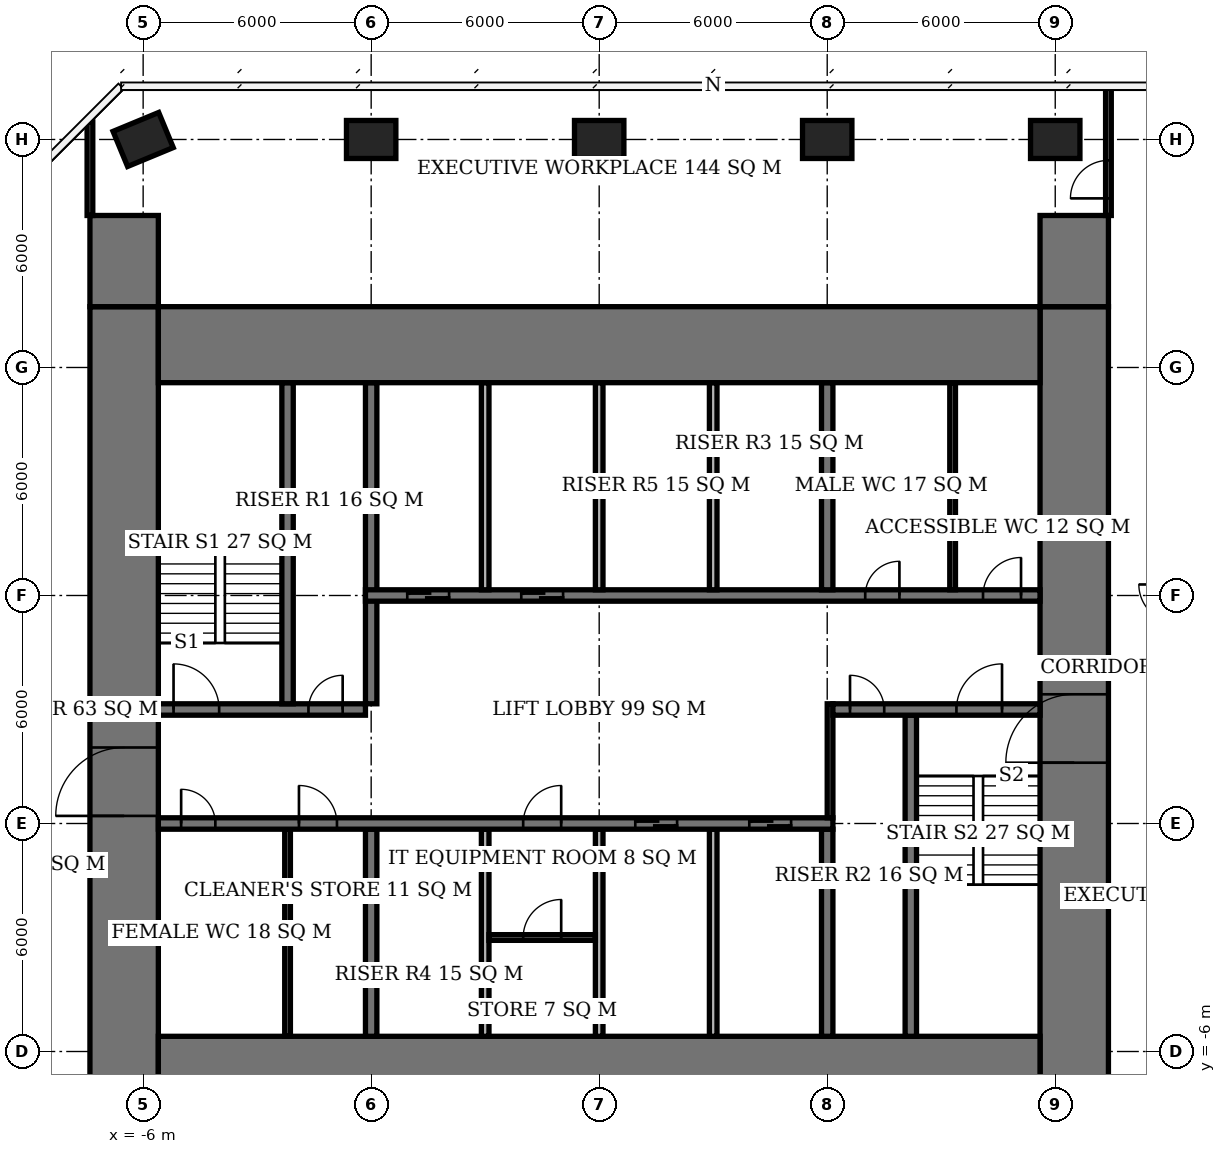
"""IFC4 building model, lengths in metres.
Left out: names, types, materials, properties, quantities, classifications, styles, units other than length and angle.
Written with IfcOpenShell. Run it as: python <this file> out.ifc"""

import sys

from ifc_helpers import new_model, si_unit, direction, frame, frame_2d, origin, origin_2d, place, context, subcontext, project, spatial, rectangle, extrude, element, fill, save


model = new_model("IFC4")
c1 = context("Model", 3, precision=1e-05, world=origin(), true_north=direction((0.0, 1.0)))
c2 = subcontext(c1, "Body", "Model", "MODEL_VIEW")
j1 = project(units=[si_unit("LENGTHUNIT", "METRE"), si_unit("PLANEANGLEUNIT", "RADIAN")], contexts=[c1])
p1 = place(None, origin())
s1 = spatial("IfcSite", under=j1, at=p1, CompositionType="ELEMENT")
p2 = place(p1, origin())
s2 = spatial("IfcBuilding", under=s1, at=p2, CompositionType="ELEMENT")
p3 = place(p2, frame((0.0, 0.0, 291.8)))
s3 = spatial("IfcBuildingStorey", under=s2, at=p3, CompositionType="ELEMENT", Elevation=291.8)
for number, where, z_axis, x_axis in (
    (1, (-6.0, 18.0, 0.0), (0.0, 0.0, 1.0), (0.924, 0.383, 0.0)),
    (2, (0.0, 18.0, 0.0), (0.0, 0.0, 1.0), (1.0, 0.0, 0.0)),
    (3, (6.0, 18.0, 0.0), (0.0, 0.0, 1.0), (1.0, 0.0, 0.0)),
    (4, (12.0, 18.0, 0.0), (0.0, 0.0, 1.0), (1.0, 0.0, 0.0)),
    (5, (18.0, 18.0, 0.0), (0.0, 0.0, 1.0), (1.0, 0.0, 0.0)),
):
    element("IfcColumn", number, at=place(p3, frame(where, z_axis=z_axis, x_axis=x_axis)), inside=s3, PredefinedType="COLUMN", context=c2, shape_type="SweptSolid", body=[
        extrude(rectangle(XDim=1.3, YDim=1.0, at=origin_2d()), origin(), (0.0, 0.0, 1.0), 3.9),
    ])
for number, where, z_axis, x_axis in (
    (6, (-5.6, -6.6, 0.0), (0.0, 0.0, 1.0), (1.0, 0.0, 0.0)),
    (7, (-5.6, 12.6, 0.0), (0.0, 0.0, 1.0), (1.0, 0.0, 0.0)),
):
    element("IfcWall", number, at=place(p3, frame(where, z_axis=z_axis, x_axis=x_axis)), inside=s3, PredefinedType="SHEAR", context=c2, shape_type="SweptSolid", body=[
        extrude(rectangle(XDim=23.2, YDim=2.0, at=frame_2d((11.6, 0.0))), origin(), (0.0, 0.0, 1.0), 3.9),
    ])
p4 = place(p3, frame((-6.5, -7.6, 0.0), z_axis=(0.0, 0.0, 1.0), x_axis=(0.0, 1.0, 0.0)))
e8 = element("IfcWall", 8, at=p4, inside=s3, PredefinedType="SHEAR", context=c2, shape_type="SweptSolid", body=[
    extrude(rectangle(XDim=21.2, YDim=1.8, at=frame_2d((10.6, 0.0))), origin(), (0.0, 0.0, 1.0), 3.9),
])
p5 = place(p4, frame((7.8, 0.0, 0.0)))
e9 = element("IfcOpeningElement", 9, at=p5, cuts=e8, PredefinedType="OPENING", context=c2, shape_type="SweptSolid", body=[
    extrude(rectangle(XDim=1.8, YDim=2.4, at=frame_2d((0.9, 1.2))), frame((0.0, 0.91, 0.0), z_axis=(0.0, -1.0, 0.0), x_axis=(1.0, 0.0, 0.0)), (0.0, 0.0, 1.0), 1.82),
])
p6 = place(p3, frame((18.5, -7.6, 0.0), z_axis=(0.0, 0.0, 1.0), x_axis=(0.0, 1.0, 0.0)))
e10 = element("IfcWall", 10, at=p6, inside=s3, PredefinedType="SHEAR", context=c2, shape_type="SweptSolid", body=[
    extrude(rectangle(XDim=21.2, YDim=1.8, at=frame_2d((10.6, 0.0))), origin(), (0.0, 0.0, 1.0), 3.9),
])
p7 = place(p6, frame((9.2, 0.0, 0.0)))
e11 = element("IfcOpeningElement", 11, at=p7, cuts=e10, PredefinedType="OPENING", context=c2, shape_type="SweptSolid", body=[
    extrude(rectangle(XDim=1.8, YDim=2.4, at=frame_2d((0.9, 1.2))), frame((0.0, 0.91, 0.0), z_axis=(0.0, -1.0, 0.0), x_axis=(1.0, 0.0, 0.0)), (0.0, 0.0, 1.0), 1.82),
])
for number, where, z_axis, x_axis in (
    (12, (-6.5, 13.6, 0.0), (0.0, 0.0, 1.0), (0.0, 1.0, 0.0)),
    (13, (18.5, 13.6, 0.0), (0.0, 0.0, 1.0), (0.0, 1.0, 0.0)),
):
    element("IfcWall", number, at=place(p3, frame(where, z_axis=z_axis, x_axis=x_axis)), inside=s3, PredefinedType="SHEAR", context=c2, shape_type="SweptSolid", body=[
        extrude(rectangle(XDim=2.4, YDim=1.8, at=frame_2d((1.2, 0.0))), origin(), (0.0, 0.0, 1.0), 3.9),
    ])
p8 = place(p3, frame((-5.6, 0.0, 0.0), z_axis=(0.0, 0.0, 1.0), x_axis=(1.0, 0.0, 0.0)))
e14 = element("IfcWall", 14, at=p8, inside=s3, PredefinedType="SHEAR", context=c2, shape_type="SweptSolid", body=[
    extrude(rectangle(XDim=17.75, YDim=0.3, at=frame_2d((8.875, 0.0))), origin(), (0.0, 0.0, 1.0), 3.9),
])
p9 = place(p8, frame((0.6, 0.0, 0.0)))
e15 = element("IfcOpeningElement", 15, at=p9, cuts=e14, PredefinedType="OPENING", context=c2, shape_type="SweptSolid", body=[
    extrude(rectangle(XDim=0.9, YDim=2.1, at=frame_2d((0.45, 1.05))), frame((0.0, 0.16, 0.0), z_axis=(0.0, -1.0, 0.0), x_axis=(1.0, 0.0, 0.0)), (0.0, 0.0, 1.0), 0.32),
])
p10 = place(p8, frame((3.7, 0.0, 0.0)))
e16 = element("IfcOpeningElement", 16, at=p10, cuts=e14, PredefinedType="OPENING", context=c2, shape_type="SweptSolid", body=[
    extrude(rectangle(XDim=1.0, YDim=2.1, at=frame_2d((0.5, 1.05))), frame((0.0, 0.16, 0.0), z_axis=(0.0, -1.0, 0.0), x_axis=(1.0, 0.0, 0.0)), (0.0, 0.0, 1.0), 0.32),
])
p11 = place(p8, frame((9.6, 0.0, 0.0)))
e17 = element("IfcOpeningElement", 17, at=p11, cuts=e14, PredefinedType="OPENING", context=c2, shape_type="SweptSolid", body=[
    extrude(rectangle(XDim=1.0, YDim=2.1, at=frame_2d((0.5, 1.05))), frame((0.0, 0.16, 0.0), z_axis=(0.0, -1.0, 0.0), x_axis=(1.0, 0.0, 0.0)), (0.0, 0.0, 1.0), 0.32),
])
p12 = place(p8, frame((12.55, 0.0, 0.0)))
e18 = element("IfcOpeningElement", 18, at=p12, cuts=e14, PredefinedType="OPENING", context=c2, shape_type="SweptSolid", body=[
    extrude(rectangle(XDim=1.1, YDim=2.1, at=frame_2d((0.55, 1.05))), frame((0.0, 0.16, 0.0), z_axis=(0.0, -1.0, 0.0), x_axis=(1.0, 0.0, 0.0)), (0.0, 0.0, 1.0), 0.32),
])
p13 = place(p8, frame((15.55, 0.0, 0.0)))
e19 = element("IfcOpeningElement", 19, at=p13, cuts=e14, PredefinedType="OPENING", context=c2, shape_type="SweptSolid", body=[
    extrude(rectangle(XDim=1.1, YDim=2.1, at=frame_2d((0.55, 1.05))), frame((0.0, 0.16, 0.0), z_axis=(0.0, -1.0, 0.0), x_axis=(1.0, 0.0, 0.0)), (0.0, 0.0, 1.0), 0.32),
])
p14 = place(p3, frame((-5.6, 3.0, 0.0), z_axis=(0.0, 0.0, 1.0), x_axis=(1.0, 0.0, 0.0)))
e20 = element("IfcWall", 20, at=p14, inside=s3, PredefinedType="SHEAR", context=c2, shape_type="SweptSolid", body=[
    extrude(rectangle(XDim=5.45, YDim=0.3, at=frame_2d((2.725, 0.0))), origin(), (0.0, 0.0, 1.0), 3.9),
])
p15 = place(p14, frame((0.4, 0.0, 0.0)))
e21 = element("IfcOpeningElement", 21, at=p15, cuts=e20, PredefinedType="OPENING", context=c2, shape_type="SweptSolid", body=[
    extrude(rectangle(XDim=1.2, YDim=2.1, at=frame_2d((0.6, 1.05))), frame((0.0, 0.16, 0.0), z_axis=(0.0, -1.0, 0.0), x_axis=(1.0, 0.0, 0.0)), (0.0, 0.0, 1.0), 0.32),
])
p16 = place(p14, frame((3.95, 0.0, 0.0)))
e22 = element("IfcOpeningElement", 22, at=p16, cuts=e20, PredefinedType="OPENING", context=c2, shape_type="SweptSolid", body=[
    extrude(rectangle(XDim=0.9, YDim=2.1, at=frame_2d((0.45, 1.05))), frame((0.0, 0.16, 0.0), z_axis=(0.0, -1.0, 0.0), x_axis=(1.0, 0.0, 0.0)), (0.0, 0.0, 1.0), 0.32),
])
p17 = place(p3, frame((12.15, 3.0, 0.0), z_axis=(0.0, 0.0, 1.0), x_axis=(1.0, 0.0, 0.0)))
e23 = element("IfcWall", 23, at=p17, inside=s3, PredefinedType="SHEAR", context=c2, shape_type="SweptSolid", body=[
    extrude(rectangle(XDim=5.45, YDim=0.3, at=frame_2d((2.725, 0.0))), origin(), (0.0, 0.0, 1.0), 3.9),
])
p18 = place(p17, frame((3.25, 0.0, 0.0)))
e24 = element("IfcOpeningElement", 24, at=p18, cuts=e23, PredefinedType="OPENING", context=c2, shape_type="SweptSolid", body=[
    extrude(rectangle(XDim=1.2, YDim=2.1, at=frame_2d((0.6, 1.05))), frame((0.0, 0.16, 0.0), z_axis=(0.0, -1.0, 0.0), x_axis=(1.0, 0.0, 0.0)), (0.0, 0.0, 1.0), 0.32),
])
p19 = place(p17, frame((0.45, 0.0, 0.0)))
e25 = element("IfcOpeningElement", 25, at=p19, cuts=e23, PredefinedType="OPENING", context=c2, shape_type="SweptSolid", body=[
    extrude(rectangle(XDim=0.9, YDim=2.1, at=frame_2d((0.45, 1.05))), frame((0.0, 0.16, 0.0), z_axis=(0.0, -1.0, 0.0), x_axis=(1.0, 0.0, 0.0)), (0.0, 0.0, 1.0), 0.32),
])
p20 = place(p3, frame((-0.15, 6.0, 0.0), z_axis=(0.0, 0.0, 1.0), x_axis=(1.0, 0.0, 0.0)))
e26 = element("IfcWall", 26, at=p20, inside=s3, PredefinedType="SHEAR", context=c2, shape_type="SweptSolid", body=[
    extrude(rectangle(XDim=17.75, YDim=0.3, at=frame_2d((8.875, 0.0))), origin(), (0.0, 0.0, 1.0), 3.9),
])
p21 = place(p20, frame((13.15, 0.0, 0.0)))
e27 = element("IfcOpeningElement", 27, at=p21, cuts=e26, PredefinedType="OPENING", context=c2, shape_type="SweptSolid", body=[
    extrude(rectangle(XDim=0.9, YDim=2.1, at=frame_2d((0.45, 1.05))), frame((0.0, 0.16, 0.0), z_axis=(0.0, -1.0, 0.0), x_axis=(1.0, 0.0, 0.0)), (0.0, 0.0, 1.0), 0.32),
])
p22 = place(p20, frame((16.25, 0.0, 0.0)))
e28 = element("IfcOpeningElement", 28, at=p22, cuts=e26, PredefinedType="OPENING", context=c2, shape_type="SweptSolid", body=[
    extrude(rectangle(XDim=1.0, YDim=2.1, at=frame_2d((0.5, 1.05))), frame((0.0, 0.16, 0.0), z_axis=(0.0, -1.0, 0.0), x_axis=(1.0, 0.0, 0.0)), (0.0, 0.0, 1.0), 0.32),
])
p23 = place(p20, frame((1.1, 0.0, 0.0)))
e29 = element("IfcOpeningElement", 29, at=p23, cuts=e26, PredefinedType="OPENING", context=c2, shape_type="SweptSolid", body=[
    extrude(rectangle(XDim=1.1, YDim=2.1, at=frame_2d((0.55, 1.05))), frame((0.0, 0.16, 0.0), z_axis=(0.0, -1.0, 0.0), x_axis=(1.0, 0.0, 0.0)), (0.0, 0.0, 1.0), 0.32),
])
p24 = place(p20, frame((4.1, 0.0, 0.0)))
e30 = element("IfcOpeningElement", 30, at=p24, cuts=e26, PredefinedType="OPENING", context=c2, shape_type="SweptSolid", body=[
    extrude(rectangle(XDim=1.1, YDim=2.1, at=frame_2d((0.55, 1.05))), frame((0.0, 0.16, 0.0), z_axis=(0.0, -1.0, 0.0), x_axis=(1.0, 0.0, 0.0)), (0.0, 0.0, 1.0), 0.32),
])
p25 = place(p3, frame((0.0, -5.6, 0.0), z_axis=(0.0, 0.0, 1.0), x_axis=(0.0, 1.0, 0.0)))
e31 = element("IfcWall", 31, at=p25, inside=s3, PredefinedType="SHEAR", context=c2, shape_type="SweptSolid", body=[
    extrude(rectangle(XDim=5.45, YDim=0.3, at=frame_2d((2.725, 0.0))), origin(), (0.0, 0.0, 1.0), 3.9),
])
p26 = place(p3, frame((0.0, 3.15, 0.0), z_axis=(0.0, 0.0, 1.0), x_axis=(0.0, 1.0, 0.0)))
e32 = element("IfcWall", 32, at=p26, inside=s3, PredefinedType="SHEAR", context=c2, shape_type="SweptSolid", body=[
    extrude(rectangle(XDim=8.45, YDim=0.3, at=frame_2d((4.225, 0.0))), origin(), (0.0, 0.0, 1.0), 3.9),
])
for number, where, z_axis, x_axis in (
    (33, (12.0, -5.6, 0.0), (0.0, 0.0, 1.0), (0.0, 1.0, 0.0)),
    (34, (12.0, 6.15, 0.0), (0.0, 0.0, 1.0), (0.0, 1.0, 0.0)),
):
    element("IfcWall", number, at=place(p3, frame(where, z_axis=z_axis, x_axis=x_axis)), inside=s3, PredefinedType="SHEAR", context=c2, shape_type="SweptSolid", body=[
        extrude(rectangle(XDim=5.45, YDim=0.3, at=frame_2d((2.725, 0.0))), origin(), (0.0, 0.0, 1.0), 3.9),
    ])
for number, where, z_axis, x_axis in (
    (35, (-2.2, 3.15, 0.0), (0.0, 0.0, 1.0), (0.0, 1.0, 0.0)),
    (36, (14.2, -5.6, 0.0), (0.0, 0.0, 1.0), (0.0, 1.0, 0.0)),
):
    element("IfcWall", number, at=place(p3, frame(where, z_axis=z_axis, x_axis=x_axis)), inside=s3, PredefinedType="SHEAR", context=c2, shape_type="SweptSolid", body=[
        extrude(rectangle(XDim=8.45, YDim=0.3, at=frame_2d((4.225, 0.0))), origin(), (0.0, 0.0, 1.0), 3.9),
    ])
for number, where, z_axis, x_axis in (
    (37, (3.0, 6.15, 0.0), (0.0, 0.0, 1.0), (0.0, 1.0, 0.0)),
    (38, (6.0, 6.15, 0.0), (0.0, 0.0, 1.0), (0.0, 1.0, 0.0)),
    (39, (9.0, 6.15, 0.0), (0.0, 0.0, 1.0), (0.0, 1.0, 0.0)),
    (40, (3.0, -5.6, 0.0), (0.0, 0.0, 1.0), (0.0, 1.0, 0.0)),
    (41, (6.0, -5.6, 0.0), (0.0, 0.0, 1.0), (0.0, 1.0, 0.0)),
    (42, (9.0, -5.6, 0.0), (0.0, 0.0, 1.0), (0.0, 1.0, 0.0)),
):
    element("IfcWall", number, at=place(p3, frame(where, z_axis=z_axis, x_axis=x_axis)), inside=s3, PredefinedType="SOLIDWALL", context=c2, shape_type="SweptSolid", body=[
        extrude(rectangle(XDim=5.45, YDim=0.2, at=frame_2d((2.725, 0.0))), origin(), (0.0, 0.0, 1.0), 3.9),
    ])
for number, where, z_axis, x_axis in (
    (43, (-2.2, -5.6, 0.0), (0.0, 0.0, 1.0), (0.0, 1.0, 0.0)),
    (44, (15.3, 6.15, 0.0), (0.0, 0.0, 1.0), (0.0, 1.0, 0.0)),
):
    element("IfcWall", number, at=place(p3, frame(where, z_axis=z_axis, x_axis=x_axis)), inside=s3, PredefinedType="PLUMBINGWALL", context=c2, shape_type="SweptSolid", body=[
        extrude(rectangle(XDim=5.45, YDim=0.15, at=frame_2d((2.725, 0.0))), origin(), (0.0, 0.0, 1.0), 3.65),
    ])
p27 = place(p3, frame((3.1, -3.0, 0.0), z_axis=(0.0, 0.0, 1.0), x_axis=(1.0, 0.0, 0.0)))
e45 = element("IfcWall", 45, at=p27, inside=s3, PredefinedType="PARTITIONING", context=c2, shape_type="SweptSolid", body=[
    extrude(rectangle(XDim=2.8, YDim=0.15, at=frame_2d((1.4, 0.0))), origin(), (0.0, 0.0, 1.0), 3.65),
])
p28 = place(p27, frame((0.9, 0.0, 0.0)))
e46 = element("IfcOpeningElement", 46, at=p28, cuts=e45, PredefinedType="OPENING", context=c2, shape_type="SweptSolid", body=[
    extrude(rectangle(XDim=1.0, YDim=2.1, at=frame_2d((0.5, 1.05))), frame((0.0, 0.085, 0.0), z_axis=(0.0, -1.0, 0.0), x_axis=(1.0, 0.0, 0.0)), (0.0, 0.0, 1.0), 0.17),
])
p29 = place(p3, frame((-7.4, 16.0, 0.0), z_axis=(0.0, 0.0, 1.0), x_axis=(0.0, 1.0, 0.0)))
e47 = element("IfcWall", 47, at=p29, inside=s3, PredefinedType="PARTITIONING", context=c2, shape_type="SweptSolid", body=[
    extrude(rectangle(XDim=2.464, YDim=0.15, at=frame_2d((1.232, 0.0))), origin(), (0.0, 0.0, 1.0), 3.65),
])
p30 = place(p3, frame((19.4, 16.0, 0.0), z_axis=(0.0, 0.0, 1.0), x_axis=(0.0, 1.0, 0.0)))
e48 = element("IfcWall", 48, at=p30, inside=s3, PredefinedType="PARTITIONING", context=c2, shape_type="SweptSolid", body=[
    extrude(rectangle(XDim=3.375, YDim=0.15, at=frame_2d((1.688, 0.0))), origin(), (0.0, 0.0, 1.0), 3.65),
])
p31 = place(p30, frame((0.45, 0.0, 0.0)))
e49 = element("IfcOpeningElement", 49, at=p31, cuts=e48, PredefinedType="OPENING", context=c2, shape_type="SweptSolid", body=[
    extrude(rectangle(XDim=1.0, YDim=2.1, at=frame_2d((0.5, 1.05))), frame((0.0, 0.085, 0.0), z_axis=(0.0, -1.0, 0.0), x_axis=(1.0, 0.0, 0.0)), (0.0, 0.0, 1.0), 0.17),
])
p32 = place(p3, frame((12.075, 0.15, 0.0), z_axis=(0.0, 0.0, 1.0), x_axis=(0.0, 1.0, 0.0)))
e50 = element("IfcWall", 50, at=p32, inside=s3, PredefinedType="PARTITIONING", context=c2, shape_type="SweptSolid", body=[
    extrude(rectangle(XDim=3.0, YDim=0.15, at=frame_2d((1.5, 0.0))), origin(), (0.0, 0.0, 1.0), 3.65),
])
p33 = place(p5, origin())
e51 = element("IfcDoor", 51, at=p33, inside=s3, OperationType="DOUBLE_DOOR_SINGLE_SWING", PredefinedType="DOOR", context=c2, shape_type="SweptSolid", body=[
    extrude(rectangle(XDim=1.8, YDim=2.4, at=frame_2d((0.9, 1.2))), frame((0.0, 0.025, 0.0), z_axis=(0.0, -1.0, 0.0), x_axis=(1.0, 0.0, 0.0)), (0.0, 0.0, 1.0), 0.05),
])
fill(e9, e51)
p34 = place(p7, origin())
e52 = element("IfcDoor", 52, at=p34, inside=s3, OperationType="DOUBLE_DOOR_SINGLE_SWING", PredefinedType="DOOR", context=c2, shape_type="SweptSolid", body=[
    extrude(rectangle(XDim=1.8, YDim=2.4, at=frame_2d((0.9, 1.2))), frame((0.0, 0.025, 0.0), z_axis=(0.0, -1.0, 0.0), x_axis=(1.0, 0.0, 0.0)), (0.0, 0.0, 1.0), 0.05),
])
fill(e11, e52)
p35 = place(p15, origin())
e53 = element("IfcDoor", 53, at=p35, inside=s3, OperationType="SINGLE_SWING_LEFT", PredefinedType="DOOR", context=c2, shape_type="SweptSolid", body=[
    extrude(rectangle(XDim=1.2, YDim=2.1, at=frame_2d((0.6, 1.05))), frame((0.0, 0.025, 0.0), z_axis=(0.0, -1.0, 0.0), x_axis=(1.0, 0.0, 0.0)), (0.0, 0.0, 1.0), 0.05),
])
fill(e21, e53)
p36 = place(p16, origin())
e54 = element("IfcDoor", 54, at=p36, inside=s3, OperationType="SINGLE_SWING_RIGHT", PredefinedType="DOOR", context=c2, shape_type="SweptSolid", body=[
    extrude(rectangle(XDim=0.9, YDim=2.1, at=frame_2d((0.45, 1.05))), frame((0.0, 0.025, 0.0), z_axis=(0.0, -1.0, 0.0), x_axis=(1.0, 0.0, 0.0)), (0.0, 0.0, 1.0), 0.05),
])
fill(e22, e54)
p37 = place(p18, origin())
e55 = element("IfcDoor", 55, at=p37, inside=s3, OperationType="SINGLE_SWING_RIGHT", PredefinedType="DOOR", context=c2, shape_type="SweptSolid", body=[
    extrude(rectangle(XDim=1.2, YDim=2.1, at=frame_2d((0.6, 1.05))), frame((0.0, 0.025, 0.0), z_axis=(0.0, -1.0, 0.0), x_axis=(1.0, 0.0, 0.0)), (0.0, 0.0, 1.0), 0.05),
])
fill(e24, e55)
p38 = place(p19, origin())
e56 = element("IfcDoor", 56, at=p38, inside=s3, OperationType="SINGLE_SWING_LEFT", PredefinedType="DOOR", context=c2, shape_type="SweptSolid", body=[
    extrude(rectangle(XDim=0.9, YDim=2.1, at=frame_2d((0.45, 1.05))), frame((0.0, 0.025, 0.0), z_axis=(0.0, -1.0, 0.0), x_axis=(1.0, 0.0, 0.0)), (0.0, 0.0, 1.0), 0.05),
])
fill(e25, e56)
p39 = place(p9, origin())
e57 = element("IfcDoor", 57, at=p39, inside=s3, OperationType="SINGLE_SWING_LEFT", PredefinedType="DOOR", context=c2, shape_type="SweptSolid", body=[
    extrude(rectangle(XDim=0.9, YDim=2.1, at=frame_2d((0.45, 1.05))), frame((0.0, 0.025, 0.0), z_axis=(0.0, -1.0, 0.0), x_axis=(1.0, 0.0, 0.0)), (0.0, 0.0, 1.0), 0.05),
])
fill(e15, e57)
p40 = place(p10, origin())
e58 = element("IfcDoor", 58, at=p40, inside=s3, OperationType="SINGLE_SWING_LEFT", PredefinedType="DOOR", context=c2, shape_type="SweptSolid", body=[
    extrude(rectangle(XDim=1.0, YDim=2.1, at=frame_2d((0.5, 1.05))), frame((0.0, 0.025, 0.0), z_axis=(0.0, -1.0, 0.0), x_axis=(1.0, 0.0, 0.0)), (0.0, 0.0, 1.0), 0.05),
])
fill(e16, e58)
p41 = place(p21, origin())
e59 = element("IfcDoor", 59, at=p41, inside=s3, OperationType="SINGLE_SWING_RIGHT", PredefinedType="DOOR", context=c2, shape_type="SweptSolid", body=[
    extrude(rectangle(XDim=0.9, YDim=2.1, at=frame_2d((0.45, 1.05))), frame((0.0, 0.025, 0.0), z_axis=(0.0, -1.0, 0.0), x_axis=(1.0, 0.0, 0.0)), (0.0, 0.0, 1.0), 0.05),
])
fill(e27, e59)
p42 = place(p22, origin())
e60 = element("IfcDoor", 60, at=p42, inside=s3, OperationType="SINGLE_SWING_RIGHT", PredefinedType="DOOR", context=c2, shape_type="SweptSolid", body=[
    extrude(rectangle(XDim=1.0, YDim=2.1, at=frame_2d((0.5, 1.05))), frame((0.0, 0.025, 0.0), z_axis=(0.0, -1.0, 0.0), x_axis=(1.0, 0.0, 0.0)), (0.0, 0.0, 1.0), 0.05),
])
fill(e28, e60)
p43 = place(p28, origin())
e61 = element("IfcDoor", 61, at=p43, inside=s3, OperationType="SINGLE_SWING_RIGHT", PredefinedType="DOOR", context=c2, shape_type="SweptSolid", body=[
    extrude(rectangle(XDim=1.0, YDim=2.1, at=frame_2d((0.5, 1.05))), frame((0.0, 0.025, 0.0), z_axis=(0.0, -1.0, 0.0), x_axis=(1.0, 0.0, 0.0)), (0.0, 0.0, 1.0), 0.05),
])
fill(e46, e61)
p44 = place(p11, origin())
e62 = element("IfcDoor", 62, at=p44, inside=s3, OperationType="SINGLE_SWING_RIGHT", PredefinedType="DOOR", context=c2, shape_type="SweptSolid", body=[
    extrude(rectangle(XDim=1.0, YDim=2.1, at=frame_2d((0.5, 1.05))), frame((0.0, 0.025, 0.0), z_axis=(0.0, -1.0, 0.0), x_axis=(1.0, 0.0, 0.0)), (0.0, 0.0, 1.0), 0.05),
])
fill(e17, e62)
p45 = place(p23, origin())
e63 = element("IfcDoor", 63, at=p45, inside=s3, OperationType="DOUBLE_DOOR_SLIDING", PredefinedType="USERDEFINED", context=c2, shape_type="SweptSolid", body=[
    extrude(rectangle(XDim=1.1, YDim=2.1, at=frame_2d((0.55, 1.05))), frame((0.0, 0.025, 0.0), z_axis=(0.0, -1.0, 0.0), x_axis=(1.0, 0.0, 0.0)), (0.0, 0.0, 1.0), 0.05),
])
fill(e29, e63)
p46 = place(p24, origin())
e64 = element("IfcDoor", 64, at=p46, inside=s3, OperationType="DOUBLE_DOOR_SLIDING", PredefinedType="USERDEFINED", context=c2, shape_type="SweptSolid", body=[
    extrude(rectangle(XDim=1.1, YDim=2.1, at=frame_2d((0.55, 1.05))), frame((0.0, 0.025, 0.0), z_axis=(0.0, -1.0, 0.0), x_axis=(1.0, 0.0, 0.0)), (0.0, 0.0, 1.0), 0.05),
])
fill(e30, e64)
p47 = place(p12, origin())
e65 = element("IfcDoor", 65, at=p47, inside=s3, OperationType="DOUBLE_DOOR_SLIDING", PredefinedType="USERDEFINED", context=c2, shape_type="SweptSolid", body=[
    extrude(rectangle(XDim=1.1, YDim=2.1, at=frame_2d((0.55, 1.05))), frame((0.0, 0.025, 0.0), z_axis=(0.0, -1.0, 0.0), x_axis=(1.0, 0.0, 0.0)), (0.0, 0.0, 1.0), 0.05),
])
fill(e18, e65)
p48 = place(p13, origin())
e66 = element("IfcDoor", 66, at=p48, inside=s3, OperationType="DOUBLE_DOOR_SLIDING", PredefinedType="USERDEFINED", context=c2, shape_type="SweptSolid", body=[
    extrude(rectangle(XDim=1.1, YDim=2.1, at=frame_2d((0.55, 1.05))), frame((0.0, 0.025, 0.0), z_axis=(0.0, -1.0, 0.0), x_axis=(1.0, 0.0, 0.0)), (0.0, 0.0, 1.0), 0.05),
])
fill(e19, e66)
p49 = place(p31, origin())
e67 = element("IfcDoor", 67, at=p49, inside=s3, OperationType="SINGLE_SWING_LEFT", PredefinedType="DOOR", context=c2, shape_type="SweptSolid", body=[
    extrude(rectangle(XDim=1.0, YDim=2.1, at=frame_2d((0.5, 1.05))), frame((0.0, 0.025, 0.0), z_axis=(0.0, -1.0, 0.0), x_axis=(1.0, 0.0, 0.0)), (0.0, 0.0, 1.0), 0.05),
])
fill(e49, e67)
save(model, sys.argv[1])
